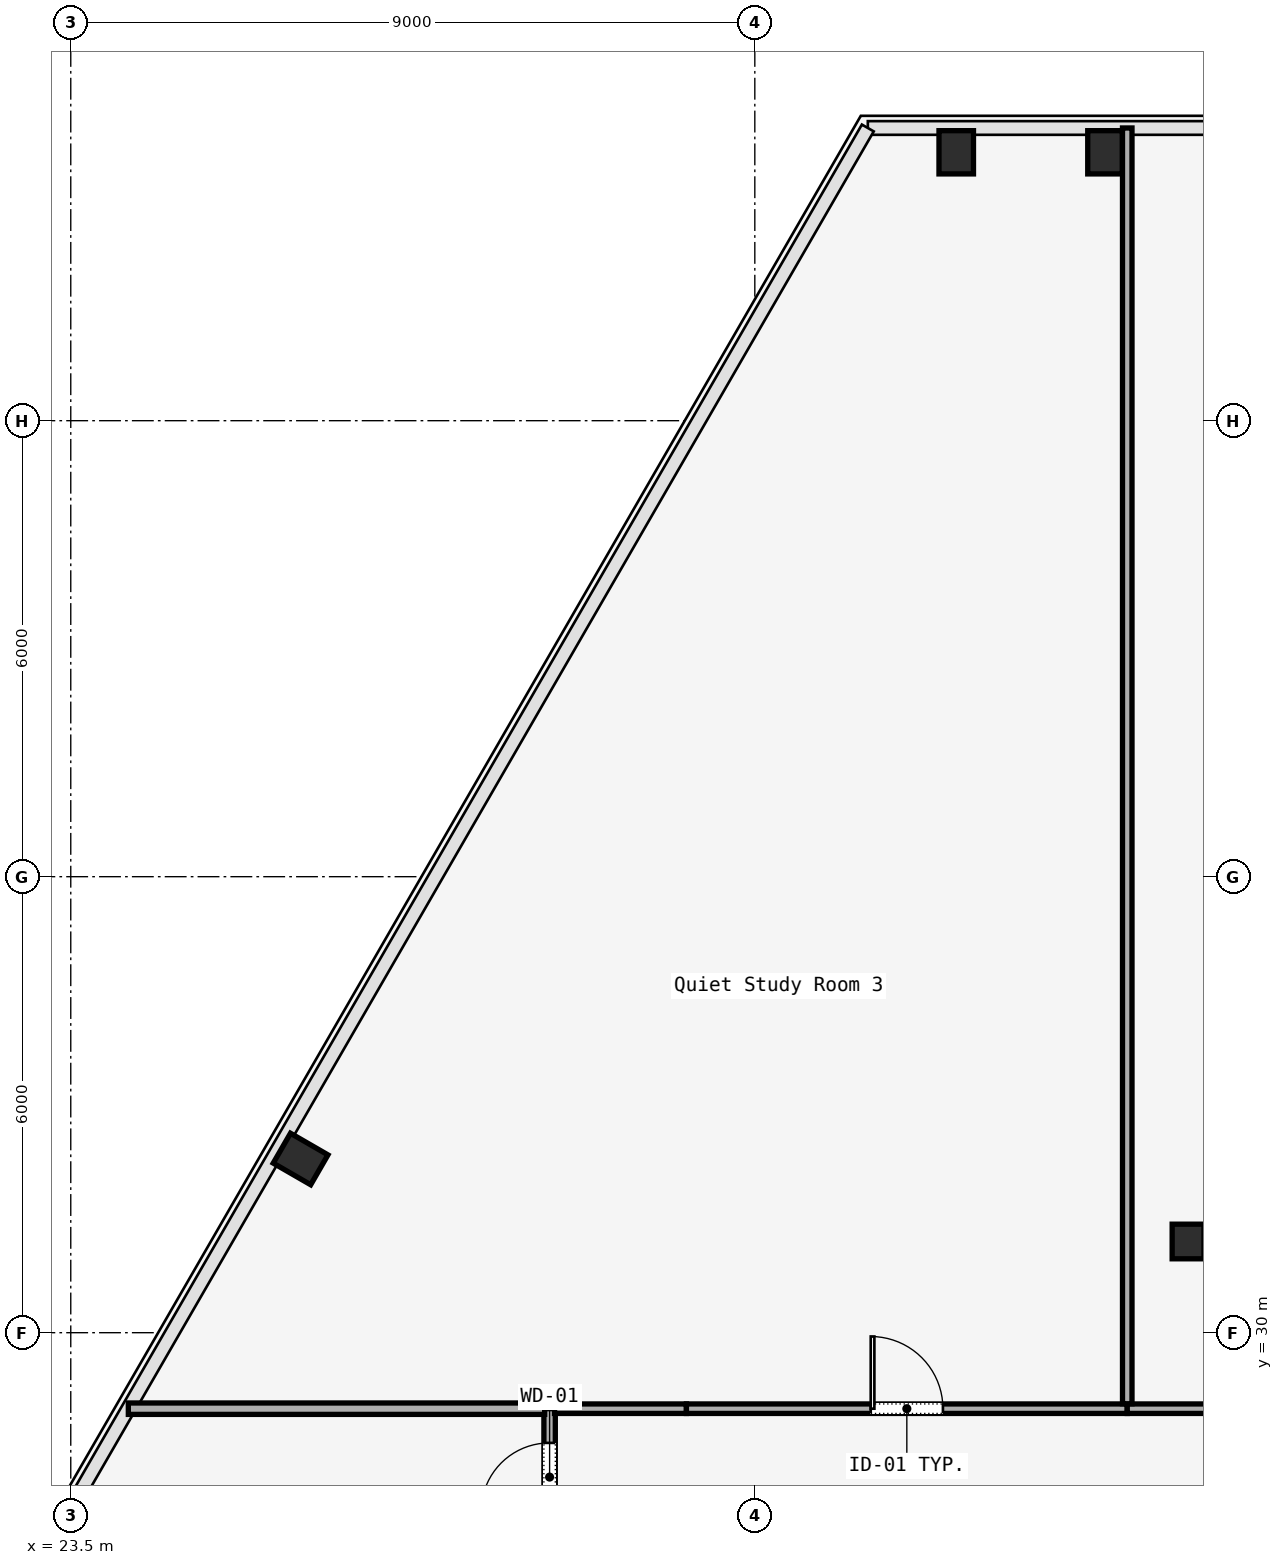
"""IFC4 building model, lengths in metres.
Left out: names, types, materials, properties, quantities, classifications, styles, units other than length and angle.
Written with IfcOpenShell. Run it as: python <this file> out.ifc"""

import sys

from ifc_helpers import new_model, si_unit, direction, frame, frame_2d, origin, origin_2d, place, context, subcontext, project, spatial, rectangle, i_section, extrude, element, fill, save


model = new_model("IFC4")
c1 = context("Model", 3, precision=1e-05, world=origin(), true_north=direction((0.0, 1.0)))
c2 = subcontext(c1, "Body", "Model", "MODEL_VIEW")
j1 = project(units=[si_unit("LENGTHUNIT", "METRE"), si_unit("PLANEANGLEUNIT", "RADIAN")], contexts=[c1])
p1 = place(None, origin())
s1 = spatial("IfcSite", under=j1, at=p1, CompositionType="ELEMENT")
p2 = place(p1, origin())
s2 = spatial("IfcBuilding", under=s1, at=p2, CompositionType="ELEMENT")
p3 = place(p2, frame((0.0, 0.0, 55.0)))
s3 = spatial("IfcBuildingStorey", under=s2, at=p3, CompositionType="ELEMENT", Elevation=55.0)
p4 = place(p3, frame((38.2, 31.2, 0.0), z_axis=(0.0, 0.0, 1.0), x_axis=(1.0, 0.0, 0.0)))
e1 = element("IfcColumn", 1, at=p4, inside=s3, PredefinedType="COLUMN", context=c2, shape_type="SweptSolid", body=[
    extrude(i_section(OverallWidth=0.418, OverallDepth=0.456, WebThickness=0.042, FlangeThickness=0.067, FilletRadius=0.015, at=origin_2d()), origin(), (0.0, 0.0, 1.0), 3.58),
])
p5 = place(p3, frame((37.107, 45.531, 0.0), z_axis=(0.044826665385, -0.001021884469, 0.998994257152), x_axis=(0.022790431559, 0.999740264383, 0.0)))
e2 = element("IfcColumn", 2, at=p5, inside=s3, PredefinedType="COLUMN", context=c2, shape_type="SweptSolid", body=[
    extrude(i_section(OverallWidth=0.454, OverallDepth=0.569, WebThickness=0.078, FlangeThickness=0.08, FilletRadius=0.015, at=origin_2d()), origin(), (0.0, 0.0, 1.0), 3.584),
])
p6 = place(p3, frame((35.15, 45.531, 0.0), z_axis=(0.06275112158, -0.001020896772, 0.998028684212), x_axis=(0.01626682787, 0.999867686402, 0.0)))
e3 = element("IfcColumn", 3, at=p6, inside=s3, PredefinedType="COLUMN", context=c2, shape_type="SweptSolid", body=[
    extrude(i_section(OverallWidth=0.454, OverallDepth=0.569, WebThickness=0.078, FlangeThickness=0.08, FilletRadius=0.015, at=origin_2d()), origin(), (0.0, 0.0, 1.0), 3.587),
])
p7 = place(p3, frame((26.524, 32.285, 0.0), z_axis=(0.03618442168, -0.062574563807, 0.99738413442), x_axis=(0.00045136117, 0.99803864152, 0.06259925164)))
e4 = element("IfcColumn", 4, at=p7, inside=s3, PredefinedType="COLUMN", context=c2, shape_type="SweptSolid", body=[
    extrude(i_section(OverallWidth=0.454, OverallDepth=0.569, WebThickness=0.078, FlangeThickness=0.08, FilletRadius=0.015, at=origin_2d()), origin(), (0.0, 0.0, 1.0), 3.589),
])
p8 = place(p3, frame((29.8, 27.2, 0.0), z_axis=(0.0, 0.0, 1.0), x_axis=(0.0, 1.0, 0.0)))
e5 = element("IfcWall", 5, at=p8, inside=s3, PredefinedType="PARTITIONING", context=c2, shape_type="SweptSolid", body=[
    extrude(rectangle(XDim=1.8, YDim=0.15, at=frame_2d((0.9, 0.0))), origin(), (0.0, 0.0, 1.0), 2.933),
])
p9 = place(p8, frame((0.45, 0.0, 0.0)))
e6 = element("IfcOpeningElement", 6, at=p9, cuts=e5, PredefinedType="OPENING", context=c2, shape_type="SweptSolid", body=[
    extrude(rectangle(XDim=0.9, YDim=2.15, at=frame_2d((0.45, 1.075))), frame((0.0, 0.075, 0.0), z_axis=(0.0, -1.0, 0.0), x_axis=(1.0, 0.0, 0.0)), (0.0, 0.0, 1.0), 0.15),
])
p10 = place(p3, frame((29.865, 29.0, 0.0), z_axis=(0.0, 0.0, 1.0), x_axis=(1.0, 0.0, 0.0)))
e7 = element("IfcWall", 7, at=p10, inside=s3, PredefinedType="PARTITIONING", context=c2, shape_type="SweptSolid", body=[
    extrude(rectangle(XDim=1.735, YDim=0.125, at=frame_2d((0.868, 0.0))), origin(), (0.0, 0.0, 1.0), 2.933),
])
p11 = place(p3, frame((31.6, 29.0, 0.0), z_axis=(0.0, 0.0, 1.0), x_axis=(1.0, 0.0, 0.0)))
e8 = element("IfcWall", 8, at=p11, inside=s3, PredefinedType="PARTITIONING", context=c2, shape_type="SweptSolid", body=[
    extrude(rectangle(XDim=5.8, YDim=0.125, at=frame_2d((2.9, 0.0))), origin(), (0.0, 0.0, 1.0), 2.933),
])
p12 = place(p11, frame((2.425, 0.0, 0.0)))
e9 = element("IfcOpeningElement", 9, at=p12, cuts=e8, PredefinedType="OPENING", context=c2, shape_type="SweptSolid", body=[
    extrude(rectangle(XDim=0.95, YDim=2.2, at=frame_2d((0.475, 1.1))), frame((0.0, 0.062, 0.0), z_axis=(0.0, -1.0, 0.0), x_axis=(1.0, 0.0, 0.0)), (0.0, 0.0, 1.0), 0.125),
])
p13 = place(p3, frame((37.4, 29.0, 0.0), z_axis=(0.0, 0.0, 1.0), x_axis=(1.0, 0.0, 0.0)))
e10 = element("IfcWall", 10, at=p13, inside=s3, PredefinedType="PARTITIONING", context=c2, shape_type="SweptSolid", body=[
    extrude(rectangle(XDim=7.2, YDim=0.125, at=frame_2d((3.6, 0.0))), origin(), (0.0, 0.0, 1.0), 2.933),
])
p14 = place(p13, frame((2.9, 0.0, 0.0)))
e11 = element("IfcOpeningElement", 11, at=p14, cuts=e10, PredefinedType="OPENING", context=c2, shape_type="SweptSolid", body=[
    extrude(rectangle(XDim=1.4, YDim=2.2, at=frame_2d((0.7, 1.1))), frame((0.0, 0.062, 0.0), z_axis=(0.0, -1.0, 0.0), x_axis=(1.0, 0.0, 0.0)), (0.0, 0.0, 1.0), 0.125),
])
p15 = place(p3, frame((24.258, 29.0, 0.0), z_axis=(0.0, 0.0, 1.0), x_axis=(1.0, 0.0, 0.0)))
e12 = element("IfcWall", 12, at=p15, inside=s3, PredefinedType="PARTITIONING", context=c2, shape_type="SweptSolid", body=[
    extrude(rectangle(XDim=5.478, YDim=0.15, at=frame_2d((2.739, 0.0))), origin(), (0.0, 0.0, 1.0), 2.933),
])
p16 = place(p3, frame((37.4, 45.851, 0.0), z_axis=(0.0, 0.0, 1.0), x_axis=(0.0, -1.0, 0.0)))
e13 = element("IfcWall", 13, at=p16, inside=s3, PredefinedType="PARTITIONING", context=c2, shape_type="SweptSolid", body=[
    extrude(rectangle(XDim=16.786, YDim=0.125, at=frame_2d((8.393, 0.0))), origin(), (0.0, 0.0, 1.0), 2.933),
])
p17 = place(p9, origin())
e14 = element("IfcDoor", 14, at=p17, inside=s3, OperationType="SINGLE_SWING_LEFT", PredefinedType="DOOR", context=c2, shape_type="SweptSolid", body=[
    extrude(rectangle(XDim=0.9, YDim=2.15, at=frame_2d((0.45, 1.075))), frame((0.0, 0.025, 0.0), z_axis=(0.0, -1.0, 0.0), x_axis=(1.0, 0.0, 0.0)), (0.0, 0.0, 1.0), 0.05),
])
fill(e6, e14)
p18 = place(p12, origin())
e15 = element("IfcDoor", 15, at=p18, inside=s3, OperationType="SINGLE_SWING_LEFT", PredefinedType="DOOR", context=c2, shape_type="SweptSolid", body=[
    extrude(rectangle(XDim=0.95, YDim=2.2, at=frame_2d((0.475, 1.1))), frame((0.0, 0.025, 0.0), z_axis=(0.0, -1.0, 0.0), x_axis=(1.0, 0.0, 0.0)), (0.0, 0.0, 1.0), 0.05),
])
fill(e9, e15)
save(model, sys.argv[1])
